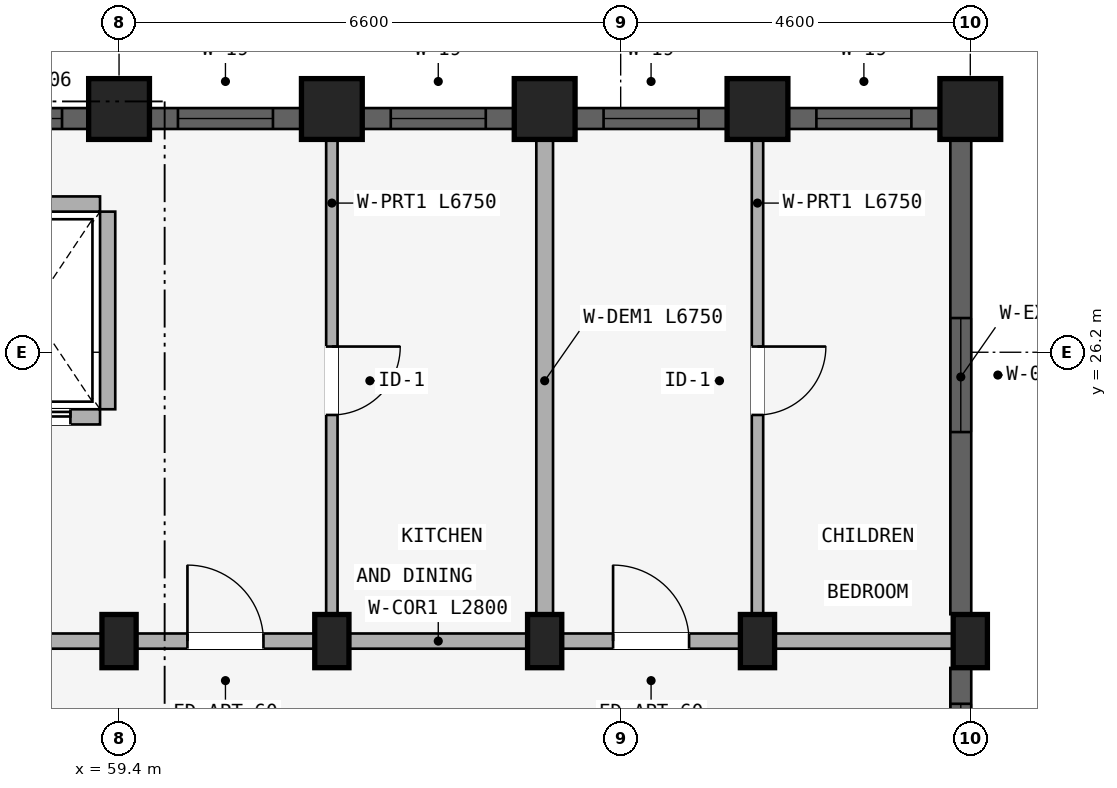
"""IFC4 building model, lengths in metres.
Left out: names, types, materials, properties, quantities, classifications, styles, units other than length and angle.
Written with IfcOpenShell. Run it as: python <this file> out.ifc"""

import sys

from ifc_helpers import new_model, si_unit, direction, frame, frame_2d, origin, origin_2d, place, context, subcontext, project, spatial, rectangle, extrude, element, fill, save


model = new_model("IFC4")
c1 = context("Model", 3, precision=1e-05, world=origin(), true_north=direction((0.0, 1.0)))
c2 = subcontext(c1, "Body", "Model", "MODEL_VIEW")
j1 = project(units=[si_unit("LENGTHUNIT", "METRE"), si_unit("PLANEANGLEUNIT", "RADIAN")], contexts=[c1])
p1 = place(None, origin())
s1 = spatial("IfcSite", under=j1, at=p1, CompositionType="ELEMENT")
p2 = place(p1, origin())
s2 = spatial("IfcBuilding", under=s1, at=p2, CompositionType="ELEMENT")
p3 = place(p2, frame((0.0, 0.0, 11.85)))
s3 = spatial("IfcBuildingStorey", under=s2, at=p3, CompositionType="ELEMENT", Elevation=11.85)
p4 = place(p3, frame((59.4, 29.4, 0.0), z_axis=(0.0, 0.0, 1.0), x_axis=(1.0, 0.0, 0.0)))
e1 = element("IfcColumn", 1, at=p4, inside=s3, PredefinedType="COLUMN", context=c2, shape_type="SweptSolid", body=[
    extrude(rectangle(XDim=0.8, YDim=0.8, at=origin_2d()), origin(), (0.0, 0.0, 1.0), 2.93),
])
p5 = place(p3, frame((59.4, 22.4, 0.0), z_axis=(0.0, 0.0, 1.0), x_axis=(1.0, 0.0, 0.0)))
e2 = element("IfcColumn", 2, at=p5, inside=s3, PredefinedType="COLUMN", context=c2, shape_type="SweptSolid", body=[
    extrude(rectangle(XDim=0.45, YDim=0.7, at=origin_2d()), origin(), (0.0, 0.0, 1.0), 2.93),
])
p6 = place(p3, frame((62.2, 29.4, 0.0), z_axis=(0.0, 0.0, 1.0), x_axis=(1.0, 0.0, 0.0)))
e3 = element("IfcColumn", 3, at=p6, inside=s3, PredefinedType="COLUMN", context=c2, shape_type="SweptSolid", body=[
    extrude(rectangle(XDim=0.8, YDim=0.8, at=origin_2d()), origin(), (0.0, 0.0, 1.0), 2.93),
])
p7 = place(p3, frame((62.2, 22.4, 0.0), z_axis=(0.0, 0.0, 1.0), x_axis=(1.0, 0.0, 0.0)))
e4 = element("IfcColumn", 4, at=p7, inside=s3, PredefinedType="COLUMN", context=c2, shape_type="SweptSolid", body=[
    extrude(rectangle(XDim=0.45, YDim=0.7, at=origin_2d()), origin(), (0.0, 0.0, 1.0), 2.93),
])
p8 = place(p3, frame((65.0, 29.4, 0.0), z_axis=(0.0, 0.0, 1.0), x_axis=(1.0, 0.0, 0.0)))
e5 = element("IfcColumn", 5, at=p8, inside=s3, PredefinedType="COLUMN", context=c2, shape_type="SweptSolid", body=[
    extrude(rectangle(XDim=0.8, YDim=0.8, at=origin_2d()), origin(), (0.0, 0.0, 1.0), 2.93),
])
p9 = place(p3, frame((65.0, 22.4, 0.0), z_axis=(0.0, 0.0, 1.0), x_axis=(1.0, 0.0, 0.0)))
e6 = element("IfcColumn", 6, at=p9, inside=s3, PredefinedType="COLUMN", context=c2, shape_type="SweptSolid", body=[
    extrude(rectangle(XDim=0.45, YDim=0.7, at=origin_2d()), origin(), (0.0, 0.0, 1.0), 2.93),
])
p10 = place(p3, frame((67.8, 29.4, 0.0), z_axis=(0.0, 0.0, 1.0), x_axis=(1.0, 0.0, 0.0)))
e7 = element("IfcColumn", 7, at=p10, inside=s3, PredefinedType="COLUMN", context=c2, shape_type="SweptSolid", body=[
    extrude(rectangle(XDim=0.8, YDim=0.8, at=origin_2d()), origin(), (0.0, 0.0, 1.0), 2.93),
])
p11 = place(p3, frame((67.8, 22.4, 0.0), z_axis=(0.0, 0.0, 1.0), x_axis=(1.0, 0.0, 0.0)))
e8 = element("IfcColumn", 8, at=p11, inside=s3, PredefinedType="COLUMN", context=c2, shape_type="SweptSolid", body=[
    extrude(rectangle(XDim=0.45, YDim=0.7, at=origin_2d()), origin(), (0.0, 0.0, 1.0), 2.93),
])
p12 = place(p3, frame((70.6, 29.4, 0.0), z_axis=(0.0, 0.0, 1.0), x_axis=(1.0, 0.0, 0.0)))
e9 = element("IfcColumn", 9, at=p12, inside=s3, PredefinedType="COLUMN", context=c2, shape_type="SweptSolid", body=[
    extrude(rectangle(XDim=0.8, YDim=0.8, at=origin_2d()), origin(), (0.0, 0.0, 1.0), 2.93),
])
p13 = place(p3, frame((70.6, 22.4, 0.0), z_axis=(0.0, 0.0, 1.0), x_axis=(1.0, 0.0, 0.0)))
e10 = element("IfcColumn", 10, at=p13, inside=s3, PredefinedType="COLUMN", context=c2, shape_type="SweptSolid", body=[
    extrude(rectangle(XDim=0.45, YDim=0.7, at=origin_2d()), origin(), (0.0, 0.0, 1.0), 2.93),
])
p14 = place(p3, frame((59.25, 28.05, 0.0), z_axis=(0.0, 0.0, 1.0), x_axis=(0.0, -1.0, 0.0)))
e11 = element("IfcWall", 11, at=p14, inside=s3, PredefinedType="STANDARD", context=c2, shape_type="SweptSolid", body=[
    extrude(rectangle(XDim=2.6, YDim=0.2, at=frame_2d((1.3, 0.0))), origin(), (0.0, 0.0, 1.0), 2.372),
])
p15 = place(p3, frame((57.35, 28.15, 0.0), z_axis=(0.0, 0.0, 1.0), x_axis=(1.0, 0.0, 0.0)))
e12 = element("IfcWall", 12, at=p15, inside=s3, PredefinedType="STANDARD", context=c2, shape_type="SweptSolid", body=[
    extrude(rectangle(XDim=1.8, YDim=0.2, at=frame_2d((0.9, 0.0))), origin(), (0.0, 0.0, 1.0), 2.93),
])
p16 = place(p3, frame((57.35, 25.35, 0.0), z_axis=(0.0, 0.0, 1.0), x_axis=(1.0, 0.0, 0.0)))
e13 = element("IfcWall", 13, at=p16, inside=s3, PredefinedType="STANDARD", context=c2, shape_type="SweptSolid", body=[
    extrude(rectangle(XDim=1.8, YDim=0.2, at=frame_2d((0.9, 0.0))), origin(), (0.0, 0.0, 1.0), 2.93),
])
p17 = place(p16, frame((0.39, 0.0, 0.0)))
e14 = element("IfcOpeningElement", 14, at=p17, cuts=e13, PredefinedType="OPENING", context=c2, shape_type="SweptSolid", body=[
    extrude(rectangle(XDim=1.02, YDim=2.15, at=frame_2d((0.51, 1.075))), frame((0.0, 0.11, 0.0), z_axis=(0.0, -1.0, 0.0), x_axis=(1.0, 0.0, 0.0)), (0.0, 0.0, 1.0), 0.22),
])
p18 = place(p3, frame((53.75, 22.4, 0.0), z_axis=(0.0, 0.0, 1.0), x_axis=(1.0, 0.0, 0.0)))
e15 = element("IfcWall", 15, at=p18, inside=s3, PredefinedType="STANDARD", context=c2, shape_type="SweptSolid", body=[
    extrude(rectangle(XDim=5.6, YDim=0.2, at=frame_2d((2.8, 0.0))), origin(), (0.0, 0.0, 1.0), 2.372),
])
p19 = place(p18, frame((1.91, 0.0, 0.0)))
e16 = element("IfcOpeningElement", 16, at=p19, cuts=e15, PredefinedType="OPENING", context=c2, shape_type="SweptSolid", body=[
    extrude(rectangle(XDim=1.22, YDim=2.15, at=frame_2d((0.61, 1.075))), frame((0.0, 0.11, 0.0), z_axis=(0.0, -1.0, 0.0), x_axis=(1.0, 0.0, 0.0)), (0.0, 0.0, 1.0), 0.22),
])
p20 = place(p3, frame((59.4, 22.4, 0.0), z_axis=(0.0, 0.0, 1.0), x_axis=(1.0, 0.0, 0.0)))
e17 = element("IfcWall", 17, at=p20, inside=s3, PredefinedType="STANDARD", context=c2, shape_type="SweptSolid", body=[
    extrude(rectangle(XDim=2.8, YDim=0.2, at=frame_2d((1.4, 0.0))), origin(), (0.0, 0.0, 1.0), 2.372),
])
p21 = place(p20, frame((0.9, 0.0, 0.0)))
e18 = element("IfcOpeningElement", 18, at=p21, cuts=e17, PredefinedType="OPENING", context=c2, shape_type="SweptSolid", body=[
    extrude(rectangle(XDim=1.0, YDim=2.15, at=frame_2d((0.5, 1.075))), frame((0.0, 0.11, 0.0), z_axis=(0.0, -1.0, 0.0), x_axis=(1.0, 0.0, 0.0)), (0.0, 0.0, 1.0), 0.22),
])
p22 = place(p3, frame((62.2, 22.4, 0.0), z_axis=(0.0, 0.0, 1.0), x_axis=(1.0, 0.0, 0.0)))
e19 = element("IfcWall", 19, at=p22, inside=s3, PredefinedType="STANDARD", context=c2, shape_type="SweptSolid", body=[
    extrude(rectangle(XDim=2.8, YDim=0.2, at=frame_2d((1.4, 0.0))), origin(), (0.0, 0.0, 1.0), 2.372),
])
p23 = place(p3, frame((65.0, 22.4, 0.0), z_axis=(0.0, 0.0, 1.0), x_axis=(1.0, 0.0, 0.0)))
e20 = element("IfcWall", 20, at=p23, inside=s3, PredefinedType="STANDARD", context=c2, shape_type="SweptSolid", body=[
    extrude(rectangle(XDim=2.8, YDim=0.2, at=frame_2d((1.4, 0.0))), origin(), (0.0, 0.0, 1.0), 2.372),
])
p24 = place(p23, frame((0.9, 0.0, 0.0)))
e21 = element("IfcOpeningElement", 21, at=p24, cuts=e20, PredefinedType="OPENING", context=c2, shape_type="SweptSolid", body=[
    extrude(rectangle(XDim=1.0, YDim=2.15, at=frame_2d((0.5, 1.075))), frame((0.0, 0.11, 0.0), z_axis=(0.0, -1.0, 0.0), x_axis=(1.0, 0.0, 0.0)), (0.0, 0.0, 1.0), 0.22),
])
p25 = place(p3, frame((67.8, 22.4, 0.0), z_axis=(0.0, 0.0, 1.0), x_axis=(1.0, 0.0, 0.0)))
e22 = element("IfcWall", 22, at=p25, inside=s3, PredefinedType="STANDARD", context=c2, shape_type="SweptSolid", body=[
    extrude(rectangle(XDim=2.8, YDim=0.2, at=frame_2d((1.4, 0.0))), origin(), (0.0, 0.0, 1.0), 2.372),
])
p26 = place(p3, frame((62.2, 29.2, 0.0), z_axis=(0.0, 0.0, 1.0), x_axis=(0.0, -1.0, 0.0)))
e23 = element("IfcWall", 23, at=p26, inside=s3, PredefinedType="PARTITIONING", context=c2, shape_type="SweptSolid", body=[
    extrude(rectangle(XDim=6.75, YDim=0.15, at=frame_2d((3.375, 0.0))), origin(), (0.0, 0.0, 1.0), 2.372),
])
p27 = place(p26, frame((2.925, 0.0, 0.0)))
e24 = element("IfcOpeningElement", 24, at=p27, cuts=e23, PredefinedType="OPENING", context=c2, shape_type="SweptSolid", body=[
    extrude(rectangle(XDim=0.9, YDim=2.1, at=frame_2d((0.45, 1.05))), frame((0.0, 0.085, 0.0), z_axis=(0.0, -1.0, 0.0), x_axis=(1.0, 0.0, 0.0)), (0.0, 0.0, 1.0), 0.17),
])
p28 = place(p3, frame((65.0, 29.2, 0.0), z_axis=(0.0, 0.0, 1.0), x_axis=(0.0, -1.0, 0.0)))
e25 = element("IfcWall", 25, at=p28, inside=s3, PredefinedType="STANDARD", context=c2, shape_type="SweptSolid", body=[
    extrude(rectangle(XDim=6.75, YDim=0.22, at=frame_2d((3.375, 0.0))), origin(), (0.0, 0.0, 1.0), 2.372),
])
p29 = place(p3, frame((67.8, 29.2, 0.0), z_axis=(0.0, 0.0, 1.0), x_axis=(0.0, -1.0, 0.0)))
e26 = element("IfcWall", 26, at=p29, inside=s3, PredefinedType="PARTITIONING", context=c2, shape_type="SweptSolid", body=[
    extrude(rectangle(XDim=6.75, YDim=0.15, at=frame_2d((3.375, 0.0))), origin(), (0.0, 0.0, 1.0), 2.372),
])
p30 = place(p29, frame((2.925, 0.0, 0.0)))
e27 = element("IfcOpeningElement", 27, at=p30, cuts=e26, PredefinedType="OPENING", context=c2, shape_type="SweptSolid", body=[
    extrude(rectangle(XDim=0.9, YDim=2.1, at=frame_2d((0.45, 1.05))), frame((0.0, 0.085, 0.0), z_axis=(0.0, -1.0, 0.0), x_axis=(1.0, 0.0, 0.0)), (0.0, 0.0, 1.0), 0.17),
])
p31 = place(p3, frame((56.628, 29.275, 0.0), z_axis=(0.0, 0.0, 1.0), x_axis=(1.0, 0.0, 0.0)))
e28 = element("IfcWall", 28, at=p31, inside=s3, PredefinedType="STANDARD", context=c2, shape_type="SweptSolid", body=[
    extrude(rectangle(XDim=2.422, YDim=0.275, at=frame_2d((1.211, 0.0))), origin(), (0.0, 0.0, 1.0), 2.472),
])
p32 = place(p31, frame((0.822, 0.0, 0.772)))
e29 = element("IfcOpeningElement", 29, at=p32, cuts=e28, PredefinedType="OPENING", context=c2, shape_type="SweptSolid", body=[
    extrude(rectangle(XDim=1.2, YDim=1.5, at=frame_2d((0.6, 0.75))), frame((0.0, 0.147, 0.0), z_axis=(0.0, -1.0, 0.0), x_axis=(1.0, 0.0, 0.0)), (0.0, 0.0, 1.0), 0.295),
])
p33 = place(p3, frame((59.803, 29.275, 0.0), z_axis=(0.0, 0.0, 1.0), x_axis=(1.0, 0.0, 0.0)))
e30 = element("IfcWall", 30, at=p33, inside=s3, PredefinedType="STANDARD", context=c2, shape_type="SweptSolid", body=[
    extrude(rectangle(XDim=1.993, YDim=0.275, at=frame_2d((0.997, 0.0))), origin(), (0.0, 0.0, 1.0), 2.472),
])
p34 = place(p33, frame((0.372, 0.0, 0.722)))
e31 = element("IfcOpeningElement", 31, at=p34, cuts=e30, PredefinedType="OPENING", context=c2, shape_type="SweptSolid", body=[
    extrude(rectangle(XDim=1.25, YDim=1.55, at=frame_2d((0.625, 0.775))), frame((0.0, 0.147, 0.0), z_axis=(0.0, -1.0, 0.0), x_axis=(1.0, 0.0, 0.0)), (0.0, 0.0, 1.0), 0.295),
])
p35 = place(p3, frame((62.604, 29.275, 0.0), z_axis=(0.0, 0.0, 1.0), x_axis=(1.0, 0.0, 0.0)))
e32 = element("IfcWall", 32, at=p35, inside=s3, PredefinedType="STANDARD", context=c2, shape_type="SweptSolid", body=[
    extrude(rectangle(XDim=1.993, YDim=0.275, at=frame_2d((0.997, 0.0))), origin(), (0.0, 0.0, 1.0), 2.472),
])
p36 = place(p35, frame((0.372, 0.0, 0.722)))
e33 = element("IfcOpeningElement", 33, at=p36, cuts=e32, PredefinedType="OPENING", context=c2, shape_type="SweptSolid", body=[
    extrude(rectangle(XDim=1.25, YDim=1.55, at=frame_2d((0.625, 0.775))), frame((0.0, 0.147, 0.0), z_axis=(0.0, -1.0, 0.0), x_axis=(1.0, 0.0, 0.0)), (0.0, 0.0, 1.0), 0.295),
])
p37 = place(p3, frame((65.404, 29.275, 0.0), z_axis=(0.0, 0.0, 1.0), x_axis=(1.0, 0.0, 0.0)))
e34 = element("IfcWall", 34, at=p37, inside=s3, PredefinedType="STANDARD", context=c2, shape_type="SweptSolid", body=[
    extrude(rectangle(XDim=1.993, YDim=0.275, at=frame_2d((0.997, 0.0))), origin(), (0.0, 0.0, 1.0), 2.472),
])
p38 = place(p37, frame((0.372, 0.0, 0.722)))
e35 = element("IfcOpeningElement", 35, at=p38, cuts=e34, PredefinedType="OPENING", context=c2, shape_type="SweptSolid", body=[
    extrude(rectangle(XDim=1.25, YDim=1.55, at=frame_2d((0.625, 0.775))), frame((0.0, 0.147, 0.0), z_axis=(0.0, -1.0, 0.0), x_axis=(1.0, 0.0, 0.0)), (0.0, 0.0, 1.0), 0.295),
])
p39 = place(p3, frame((68.204, 29.275, 0.0), z_axis=(0.0, 0.0, 1.0), x_axis=(1.0, 0.0, 0.0)))
e36 = element("IfcWall", 36, at=p39, inside=s3, PredefinedType="STANDARD", context=c2, shape_type="SweptSolid", body=[
    extrude(rectangle(XDim=1.993, YDim=0.275, at=frame_2d((0.997, 0.0))), origin(), (0.0, 0.0, 1.0), 2.472),
])
p40 = place(p39, frame((0.372, 0.0, 0.722)))
e37 = element("IfcOpeningElement", 37, at=p40, cuts=e36, PredefinedType="OPENING", context=c2, shape_type="SweptSolid", body=[
    extrude(rectangle(XDim=1.25, YDim=1.55, at=frame_2d((0.625, 0.775))), frame((0.0, 0.147, 0.0), z_axis=(0.0, -1.0, 0.0), x_axis=(1.0, 0.0, 0.0)), (0.0, 0.0, 1.0), 0.295),
])
p41 = place(p3, frame((70.475, 28.997, 0.0), z_axis=(0.0, 0.0, 1.0), x_axis=(0.0, -1.0, 0.0)))
e38 = element("IfcWall", 38, at=p41, inside=s3, PredefinedType="STANDARD", context=c2, shape_type="SweptSolid", body=[
    extrude(rectangle(XDim=6.243, YDim=0.275, at=frame_2d((3.122, 0.0))), origin(), (0.0, 0.0, 1.0), 2.372),
])
p42 = place(p41, frame((2.346, 0.0, 0.522)))
e39 = element("IfcOpeningElement", 39, at=p42, cuts=e38, PredefinedType="OPENING", context=c2, shape_type="SweptSolid", body=[
    extrude(rectangle(XDim=1.5, YDim=1.65, at=frame_2d((0.75, 0.825))), frame((0.0, 0.147, 0.0), z_axis=(0.0, -1.0, 0.0), x_axis=(1.0, 0.0, 0.0)), (0.0, 0.0, 1.0), 0.295),
])
p43 = place(p3, frame((70.475, 22.046, 0.0), z_axis=(0.0, 0.0, 1.0), x_axis=(0.0, -1.0, 0.0)))
e40 = element("IfcWall", 40, at=p43, inside=s3, PredefinedType="STANDARD", context=c2, shape_type="SweptSolid", body=[
    extrude(rectangle(XDim=1.693, YDim=0.275, at=frame_2d((0.846, 0.0))), origin(), (0.0, 0.0, 1.0), 2.372),
])
p44 = place(p43, frame((0.471, 0.0, 0.88)))
e41 = element("IfcOpeningElement", 41, at=p44, cuts=e40, PredefinedType="OPENING", context=c2, shape_type="SweptSolid", body=[
    extrude(rectangle(XDim=0.75, YDim=1.05, at=frame_2d((0.375, 0.525))), frame((0.0, 0.147, 0.0), z_axis=(0.0, -1.0, 0.0), x_axis=(1.0, 0.0, 0.0)), (0.0, 0.0, 1.0), 0.295),
])
p45 = place(p32, origin())
e42 = element("IfcWindow", 42, at=p45, inside=s3, PartitioningType="SINGLE_PANEL", PredefinedType="WINDOW", context=c2, shape_type="SweptSolid", body=[
    extrude(rectangle(XDim=1.2, YDim=1.5, at=frame_2d((0.6, 0.75))), frame((0.0, 0.03, 0.0), z_axis=(0.0, -1.0, 0.0), x_axis=(1.0, 0.0, 0.0)), (0.0, 0.0, 1.0), 0.06),
])
fill(e29, e42)
p46 = place(p34, origin())
e43 = element("IfcWindow", 43, at=p46, inside=s3, PartitioningType="SINGLE_PANEL", PredefinedType="WINDOW", context=c2, shape_type="SweptSolid", body=[
    extrude(rectangle(XDim=1.25, YDim=1.55, at=frame_2d((0.625, 0.775))), frame((0.0, 0.03, 0.0), z_axis=(0.0, -1.0, 0.0), x_axis=(1.0, 0.0, 0.0)), (0.0, 0.0, 1.0), 0.06),
])
fill(e31, e43)
p47 = place(p36, origin())
e44 = element("IfcWindow", 44, at=p47, inside=s3, PartitioningType="SINGLE_PANEL", PredefinedType="WINDOW", context=c2, shape_type="SweptSolid", body=[
    extrude(rectangle(XDim=1.25, YDim=1.55, at=frame_2d((0.625, 0.775))), frame((0.0, 0.03, 0.0), z_axis=(0.0, -1.0, 0.0), x_axis=(1.0, 0.0, 0.0)), (0.0, 0.0, 1.0), 0.06),
])
fill(e33, e44)
p48 = place(p38, origin())
e45 = element("IfcWindow", 45, at=p48, inside=s3, PartitioningType="SINGLE_PANEL", PredefinedType="WINDOW", context=c2, shape_type="SweptSolid", body=[
    extrude(rectangle(XDim=1.25, YDim=1.55, at=frame_2d((0.625, 0.775))), frame((0.0, 0.03, 0.0), z_axis=(0.0, -1.0, 0.0), x_axis=(1.0, 0.0, 0.0)), (0.0, 0.0, 1.0), 0.06),
])
fill(e35, e45)
p49 = place(p40, origin())
e46 = element("IfcWindow", 46, at=p49, inside=s3, PartitioningType="SINGLE_PANEL", PredefinedType="WINDOW", context=c2, shape_type="SweptSolid", body=[
    extrude(rectangle(XDim=1.25, YDim=1.55, at=frame_2d((0.625, 0.775))), frame((0.0, 0.03, 0.0), z_axis=(0.0, -1.0, 0.0), x_axis=(1.0, 0.0, 0.0)), (0.0, 0.0, 1.0), 0.06),
])
fill(e37, e46)
p50 = place(p42, origin())
e47 = element("IfcWindow", 47, at=p50, inside=s3, PartitioningType="DOUBLE_PANEL_VERTICAL", PredefinedType="WINDOW", context=c2, shape_type="SweptSolid", body=[
    extrude(rectangle(XDim=1.5, YDim=1.65, at=frame_2d((0.75, 0.825))), frame((0.0, 0.03, 0.0), z_axis=(0.0, -1.0, 0.0), x_axis=(1.0, 0.0, 0.0)), (0.0, 0.0, 1.0), 0.06),
])
fill(e39, e47)
p51 = place(p44, origin())
e48 = element("IfcWindow", 48, at=p51, inside=s3, PartitioningType="SINGLE_PANEL", PredefinedType="WINDOW", context=c2, shape_type="SweptSolid", body=[
    extrude(rectangle(XDim=0.75, YDim=1.05, at=frame_2d((0.375, 0.525))), frame((0.0, 0.03, 0.0), z_axis=(0.0, -1.0, 0.0), x_axis=(1.0, 0.0, 0.0)), (0.0, 0.0, 1.0), 0.06),
])
fill(e41, e48)
p52 = place(p17, origin())
e49 = element("IfcDoor", 49, at=p52, inside=s3, OperationType="SLIDING_TO_RIGHT", PredefinedType="DOOR", context=c2, shape_type="SweptSolid", body=[
    extrude(rectangle(XDim=1.02, YDim=2.15, at=frame_2d((0.51, 1.075))), frame((0.0, 0.025, 0.0), z_axis=(0.0, -1.0, 0.0), x_axis=(1.0, 0.0, 0.0)), (0.0, 0.0, 1.0), 0.05),
])
fill(e14, e49)
p53 = place(p21, origin())
e50 = element("IfcDoor", 50, at=p53, inside=s3, OperationType="SINGLE_SWING_LEFT", PredefinedType="DOOR", context=c2, shape_type="SweptSolid", body=[
    extrude(rectangle(XDim=1.0, YDim=2.15, at=frame_2d((0.5, 1.075))), frame((0.0, 0.025, 0.0), z_axis=(0.0, -1.0, 0.0), x_axis=(1.0, 0.0, 0.0)), (0.0, 0.0, 1.0), 0.05),
])
fill(e18, e50)
p54 = place(p24, origin())
e51 = element("IfcDoor", 51, at=p54, inside=s3, OperationType="SINGLE_SWING_LEFT", PredefinedType="DOOR", context=c2, shape_type="SweptSolid", body=[
    extrude(rectangle(XDim=1.0, YDim=2.15, at=frame_2d((0.5, 1.075))), frame((0.0, 0.025, 0.0), z_axis=(0.0, -1.0, 0.0), x_axis=(1.0, 0.0, 0.0)), (0.0, 0.0, 1.0), 0.05),
])
fill(e21, e51)
p55 = place(p27, frame((0.9, 0.0, 0.0), z_axis=(0.0, 0.0, 1.0), x_axis=(-1.0, 0.0, 0.0)))
e52 = element("IfcDoor", 52, at=p55, inside=s3, OperationType="SINGLE_SWING_RIGHT", PredefinedType="DOOR", context=c2, shape_type="SweptSolid", body=[
    extrude(rectangle(XDim=0.9, YDim=2.1, at=frame_2d((0.45, 1.05))), frame((0.0, 0.025, 0.0), z_axis=(0.0, -1.0, 0.0), x_axis=(1.0, 0.0, 0.0)), (0.0, 0.0, 1.0), 0.05),
])
fill(e24, e52)
p56 = place(p30, origin())
e53 = element("IfcDoor", 53, at=p56, inside=s3, OperationType="SINGLE_SWING_LEFT", PredefinedType="DOOR", context=c2, shape_type="SweptSolid", body=[
    extrude(rectangle(XDim=0.9, YDim=2.1, at=frame_2d((0.45, 1.05))), frame((0.0, 0.025, 0.0), z_axis=(0.0, -1.0, 0.0), x_axis=(1.0, 0.0, 0.0)), (0.0, 0.0, 1.0), 0.05),
])
fill(e27, e53)
save(model, sys.argv[1])
